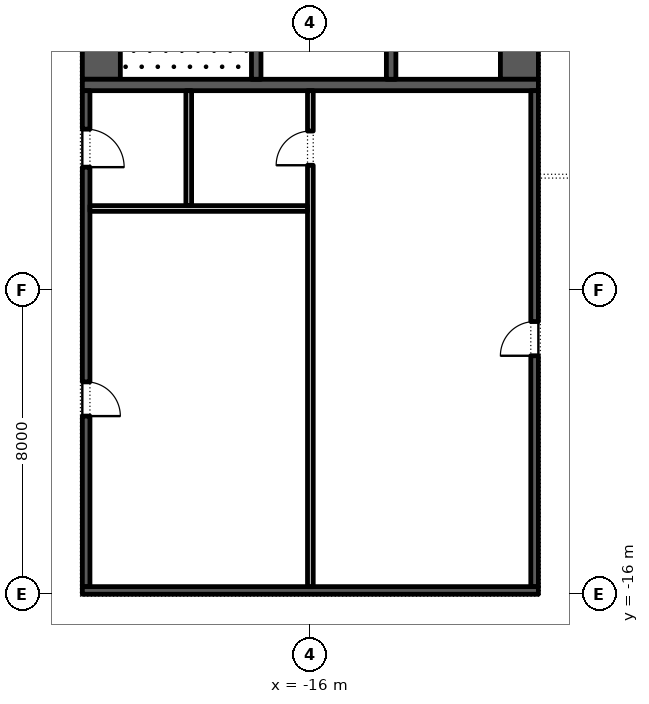
"""IFC4 building model, lengths in metres.
Left out: names, types, materials, properties, quantities, classifications, styles, units other than length and angle.
Written with IfcOpenShell. Run it as: python <this file> out.ifc"""

import sys

from ifc_helpers import new_model, si_unit, direction, frame, frame_2d, origin, place, context, subcontext, project, spatial, rectangle, extrude, element, fill, save


model = new_model("IFC4")
c1 = context("Model", 3, precision=1e-05, world=origin(), true_north=direction((0.0, 1.0)))
c2 = subcontext(c1, "Body", "Model", "MODEL_VIEW")
j1 = project(units=[si_unit("LENGTHUNIT", "METRE"), si_unit("PLANEANGLEUNIT", "RADIAN")], contexts=[c1])
p1 = place(None, origin())
s1 = spatial("IfcSite", under=j1, at=p1, CompositionType="ELEMENT")
p2 = place(p1, origin())
s2 = spatial("IfcBuilding", under=s1, at=p2, CompositionType="ELEMENT")
p3 = place(p2, frame((0.0, 0.0, 64.8)))
s3 = spatial("IfcBuildingStorey", under=s2, at=p3, CompositionType="ELEMENT", Elevation=64.8)
p4 = place(p3, frame((-21.5, -2.45, 0.0), z_axis=(0.0, 0.0, 1.0), x_axis=(0.0, 1.0, 0.0)))
e1 = element("IfcWall", 1, at=p4, inside=s3, PredefinedType="SHEAR", context=c2, shape_type="SweptSolid", body=[
    extrude(rectangle(XDim=27.9, YDim=1.0, at=frame_2d((13.95, 0.0))), origin(), (0.0, 0.0, 1.0), 4.0),
])
p5 = place(p4, frame((5.05, 0.0, 0.0)))
e2 = element("IfcOpeningElement", 2, at=p5, cuts=e1, PredefinedType="OPENING", context=c2, shape_type="SweptSolid", body=[
    extrude(rectangle(XDim=1.2, YDim=2.1, at=frame_2d((0.6, 1.05))), frame((0.0, 0.51, 0.0), z_axis=(0.0, -1.0, 0.0), x_axis=(1.0, 0.0, 0.0)), (0.0, 0.0, 1.0), 1.02),
])
p6 = place(p4, frame((21.65, 0.0, 0.0)))
e3 = element("IfcOpeningElement", 3, at=p6, cuts=e1, PredefinedType="OPENING", context=c2, shape_type="SweptSolid", body=[
    extrude(rectangle(XDim=1.2, YDim=2.1, at=frame_2d((0.6, 1.05))), frame((0.0, 0.51, 0.0), z_axis=(0.0, -1.0, 0.0), x_axis=(1.0, 0.0, 0.0)), (0.0, 0.0, 1.0), 1.02),
])
p7 = place(p3, frame((-10.5, -2.45, 0.0), z_axis=(0.0, 0.0, 1.0), x_axis=(0.0, 1.0, 0.0)))
e4 = element("IfcWall", 4, at=p7, inside=s3, PredefinedType="SHEAR", context=c2, shape_type="SweptSolid", body=[
    extrude(rectangle(XDim=27.9, YDim=1.0, at=frame_2d((13.95, 0.0))), origin(), (0.0, 0.0, 1.0), 4.0),
])
p8 = place(p7, frame((23.65, 0.0, 0.0)))
e5 = element("IfcOpeningElement", 5, at=p8, cuts=e4, PredefinedType="OPENING", context=c2, shape_type="SweptSolid", body=[
    extrude(rectangle(XDim=2.4, YDim=2.1, at=frame_2d((1.2, 1.05))), frame((0.0, 0.51, 0.0), z_axis=(0.0, -1.0, 0.0), x_axis=(1.0, 0.0, 0.0)), (0.0, 0.0, 1.0), 1.02),
])
p9 = place(p7, frame((0.788, 0.0, 0.0)))
e6 = element("IfcOpeningElement", 6, at=p9, cuts=e4, PredefinedType="OPENING", context=c2, shape_type="SweptSolid", body=[
    extrude(rectangle(XDim=0.9, YDim=2.1, at=frame_2d((0.45, 1.05))), frame((0.0, 0.51, 0.0), z_axis=(0.0, -1.0, 0.0), x_axis=(1.0, 0.0, 0.0)), (0.0, 0.0, 1.0), 1.02),
])
p10 = place(p7, frame((4.012, 0.0, 0.0)))
e7 = element("IfcOpeningElement", 7, at=p10, cuts=e4, PredefinedType="OPENING", context=c2, shape_type="SweptSolid", body=[
    extrude(rectangle(XDim=0.9, YDim=2.1, at=frame_2d((0.45, 1.05))), frame((0.0, 0.51, 0.0), z_axis=(0.0, -1.0, 0.0), x_axis=(1.0, 0.0, 0.0)), (0.0, 0.0, 1.0), 1.02),
])
p11 = place(p3, frame((-22.0, -2.6, 0.0), z_axis=(0.0, 0.0, 1.0), x_axis=(1.0, 0.0, 0.0)))
e8 = element("IfcWall", 8, at=p11, inside=s3, PredefinedType="SHEAR", context=c2, shape_type="SweptSolid", body=[
    extrude(rectangle(XDim=12.0, YDim=0.3, at=frame_2d((6.0, 0.0))), origin(), (0.0, 0.0, 1.0), 4.0),
])
p12 = place(p3, frame((-17.425, -2.45, 0.0), z_axis=(0.0, 0.0, 1.0), x_axis=(0.0, 1.0, 0.0)))
e9 = element("IfcWall", 9, at=p12, inside=s3, PredefinedType="SHEAR", context=c2, shape_type="SweptSolid", body=[
    extrude(rectangle(XDim=6.3, YDim=0.25, at=frame_2d((3.15, 0.0))), origin(), (0.0, 0.0, 1.0), 4.0),
])
p13 = place(p12, frame((5.05, 0.0, 0.0)))
e10 = element("IfcOpeningElement", 10, at=p13, cuts=e9, PredefinedType="OPENING", context=c2, shape_type="SweptSolid", body=[
    extrude(rectangle(XDim=1.2, YDim=2.1, at=frame_2d((0.6, 1.05))), frame((0.0, 0.135, 0.0), z_axis=(0.0, -1.0, 0.0), x_axis=(1.0, 0.0, 0.0)), (0.0, 0.0, 1.0), 0.27),
])
p14 = place(p3, frame((-13.875, -2.45, 0.0), z_axis=(0.0, 0.0, 1.0), x_axis=(0.0, 1.0, 0.0)))
e11 = element("IfcWall", 11, at=p14, inside=s3, PredefinedType="SHEAR", context=c2, shape_type="SweptSolid", body=[
    extrude(rectangle(XDim=21.3, YDim=0.25, at=frame_2d((10.65, 0.0))), origin(), (0.0, 0.0, 1.0), 4.0),
])
p15 = place(p14, frame((10.396, 0.0, 0.0)))
e12 = element("IfcOpeningElement", 12, at=p15, cuts=e11, PredefinedType="OPENING", context=c2, shape_type="SweptSolid", body=[
    extrude(rectangle(XDim=0.9, YDim=2.1, at=frame_2d((0.45, 1.05))), frame((0.0, 0.135, 0.0), z_axis=(0.0, -1.0, 0.0), x_axis=(1.0, 0.0, 0.0)), (0.0, 0.0, 1.0), 0.27),
])
p16 = place(p14, frame((14.6, 0.0, 0.0)))
e13 = element("IfcOpeningElement", 13, at=p16, cuts=e11, PredefinedType="OPENING", context=c2, shape_type="SweptSolid", body=[
    extrude(rectangle(XDim=0.9, YDim=2.1, at=frame_2d((0.45, 1.05))), frame((0.0, 0.135, 0.0), z_axis=(0.0, -1.0, 0.0), x_axis=(1.0, 0.0, 0.0)), (0.0, 0.0, 1.0), 0.27),
])
p17 = place(p14, frame((18.775, 0.0, 0.0)))
e14 = element("IfcOpeningElement", 14, at=p17, cuts=e11, PredefinedType="OPENING", context=c2, shape_type="SweptSolid", body=[
    extrude(rectangle(XDim=0.9, YDim=2.1, at=frame_2d((0.45, 1.05))), frame((0.0, 0.135, 0.0), z_axis=(0.0, -1.0, 0.0), x_axis=(1.0, 0.0, 0.0)), (0.0, 0.0, 1.0), 0.27),
])
p18 = place(p14, frame((6.971, 0.0, 0.0)))
e15 = element("IfcOpeningElement", 15, at=p18, cuts=e11, PredefinedType="OPENING", context=c2, shape_type="SweptSolid", body=[
    extrude(rectangle(XDim=1.1, YDim=2.1, at=frame_2d((0.55, 1.05))), frame((0.0, 0.135, 0.0), z_axis=(0.0, -1.0, 0.0), x_axis=(1.0, 0.0, 0.0)), (0.0, 0.0, 1.0), 0.27),
])
p19 = place(p3, frame((-21.9, -15.8, 0.0), z_axis=(0.0, 0.0, 1.0), x_axis=(0.0, 1.0, 0.0)))
e16 = element("IfcWall", 16, at=p19, inside=s3, PredefinedType="SHEAR", context=c2, shape_type="SweptSolid", body=[
    extrude(rectangle(XDim=13.05, YDim=0.2, at=frame_2d((6.525, 0.0))), origin(), (0.0, 0.0, 1.0), 4.0),
])
p20 = place(p19, frame((4.488, 0.0, 0.0)))
e17 = element("IfcOpeningElement", 17, at=p20, cuts=e16, PredefinedType="OPENING", context=c2, shape_type="SweptSolid", body=[
    extrude(rectangle(XDim=0.9, YDim=2.1, at=frame_2d((0.45, 1.05))), frame((0.0, 0.11, 0.0), z_axis=(0.0, -1.0, 0.0), x_axis=(1.0, 0.0, 0.0)), (0.0, 0.0, 1.0), 0.22),
])
p21 = place(p19, frame((11.038, 0.0, 0.0)))
e18 = element("IfcOpeningElement", 18, at=p21, cuts=e16, PredefinedType="OPENING", context=c2, shape_type="SweptSolid", body=[
    extrude(rectangle(XDim=1.0, YDim=2.1, at=frame_2d((0.5, 1.05))), frame((0.0, 0.11, 0.0), z_axis=(0.0, -1.0, 0.0), x_axis=(1.0, 0.0, 0.0)), (0.0, 0.0, 1.0), 0.22),
])
p22 = place(p3, frame((-10.1, -15.8, 0.0), z_axis=(0.0, 0.0, 1.0), x_axis=(0.0, 1.0, 0.0)))
e19 = element("IfcWall", 19, at=p22, inside=s3, PredefinedType="SHEAR", context=c2, shape_type="SweptSolid", body=[
    extrude(rectangle(XDim=13.05, YDim=0.2, at=frame_2d((6.525, 0.0))), origin(), (0.0, 0.0, 1.0), 4.0),
])
p23 = place(p22, frame((6.075, 0.0, 0.0)))
e20 = element("IfcOpeningElement", 20, at=p23, cuts=e19, PredefinedType="OPENING", context=c2, shape_type="SweptSolid", body=[
    extrude(rectangle(XDim=0.9, YDim=2.1, at=frame_2d((0.45, 1.05))), frame((0.0, 0.11, 0.0), z_axis=(0.0, -1.0, 0.0), x_axis=(1.0, 0.0, 0.0)), (0.0, 0.0, 1.0), 0.22),
])
p24 = place(p3, frame((-22.0, -15.9, 0.0), z_axis=(0.0, 0.0, 1.0), x_axis=(1.0, 0.0, 0.0)))
e21 = element("IfcWall", 21, at=p24, inside=s3, PredefinedType="SHEAR", context=c2, shape_type="SweptSolid", body=[
    extrude(rectangle(XDim=12.0, YDim=0.2, at=frame_2d((6.0, 0.0))), origin(), (0.0, 0.0, 1.0), 4.0),
])
p25 = place(p3, frame((-16.0, -15.8, 0.0), z_axis=(0.0, 0.0, 1.0), x_axis=(0.0, 1.0, 0.0)))
e22 = element("IfcWall", 22, at=p25, inside=s3, PredefinedType="PARTITIONING", context=c2, shape_type="SweptSolid", body=[
    extrude(rectangle(XDim=13.05, YDim=0.15, at=frame_2d((6.525, 0.0))), origin(), (0.0, 0.0, 1.0), 4.0),
])
p26 = place(p25, frame((11.087, 0.0, 0.0)))
e23 = element("IfcOpeningElement", 23, at=p26, cuts=e22, PredefinedType="OPENING", context=c2, shape_type="SweptSolid", body=[
    extrude(rectangle(XDim=0.9, YDim=2.1, at=frame_2d((0.45, 1.05))), frame((0.0, 0.085, 0.0), z_axis=(0.0, -1.0, 0.0), x_axis=(1.0, 0.0, 0.0)), (0.0, 0.0, 1.0), 0.17),
])
p27 = place(p3, frame((-21.8, -5.85, 0.0), z_axis=(0.0, 0.0, 1.0), x_axis=(1.0, 0.0, 0.0)))
e24 = element("IfcWall", 24, at=p27, inside=s3, PredefinedType="PARTITIONING", context=c2, shape_type="SweptSolid", body=[
    extrude(rectangle(XDim=5.725, YDim=0.15, at=frame_2d((2.863, 0.0))), origin(), (0.0, 0.0, 1.0), 4.0),
])
p28 = place(p3, frame((-19.2, -5.775, 0.0), z_axis=(0.0, 0.0, 1.0), x_axis=(0.0, 1.0, 0.0)))
e25 = element("IfcWall", 25, at=p28, inside=s3, PredefinedType="PARTITIONING", context=c2, shape_type="SweptSolid", body=[
    extrude(rectangle(XDim=3.025, YDim=0.15, at=frame_2d((1.512, 0.0))), origin(), (0.0, 0.0, 1.0), 4.0),
])
p29 = place(p20, frame((0.9, -0.15, 0.0), z_axis=(0.0, 0.0, 1.0), x_axis=(-1.0, 0.0, 0.0)))
e26 = element("IfcDoor", 26, at=p29, inside=s3, OperationType="SINGLE_SWING_LEFT", PredefinedType="DOOR", context=c2, shape_type="SweptSolid", body=[
    extrude(rectangle(XDim=0.9, YDim=2.1, at=frame_2d((0.45, 1.05))), frame((0.0, -0.05, 0.0), z_axis=(0.0, -1.0, 0.0), x_axis=(1.0, 0.0, 0.0)), (0.0, 0.0, 1.0), 0.05),
])
fill(e17, e26)
p30 = place(p21, frame((1.0, -0.15, 0.0), z_axis=(0.0, 0.0, 1.0), x_axis=(-1.0, 0.0, 0.0)))
e27 = element("IfcDoor", 27, at=p30, inside=s3, OperationType="SINGLE_SWING_LEFT", PredefinedType="DOOR", context=c2, shape_type="SweptSolid", body=[
    extrude(rectangle(XDim=1.0, YDim=2.1, at=frame_2d((0.5, 1.05))), frame((0.0, -0.05, 0.0), z_axis=(0.0, -1.0, 0.0), x_axis=(1.0, 0.0, 0.0)), (0.0, 0.0, 1.0), 0.05),
])
fill(e18, e27)
p31 = place(p26, origin())
e28 = element("IfcDoor", 28, at=p31, inside=s3, OperationType="SINGLE_SWING_RIGHT", PredefinedType="DOOR", context=c2, shape_type="SweptSolid", body=[
    extrude(rectangle(XDim=0.9, YDim=2.1, at=frame_2d((0.45, 1.05))), frame((0.0, 0.025, 0.0), z_axis=(0.0, -1.0, 0.0), x_axis=(1.0, 0.0, 0.0)), (0.0, 0.0, 1.0), 0.05),
])
fill(e23, e28)
p32 = place(p23, origin())
e29 = element("IfcDoor", 29, at=p32, inside=s3, OperationType="SINGLE_SWING_RIGHT", PredefinedType="DOOR", context=c2, shape_type="SweptSolid", body=[
    extrude(rectangle(XDim=0.9, YDim=2.1, at=frame_2d((0.45, 1.05))), frame((0.0, 0.1, 0.0), z_axis=(0.0, -1.0, 0.0), x_axis=(1.0, 0.0, 0.0)), (0.0, 0.0, 1.0), 0.05),
])
fill(e20, e29)
save(model, sys.argv[1])
